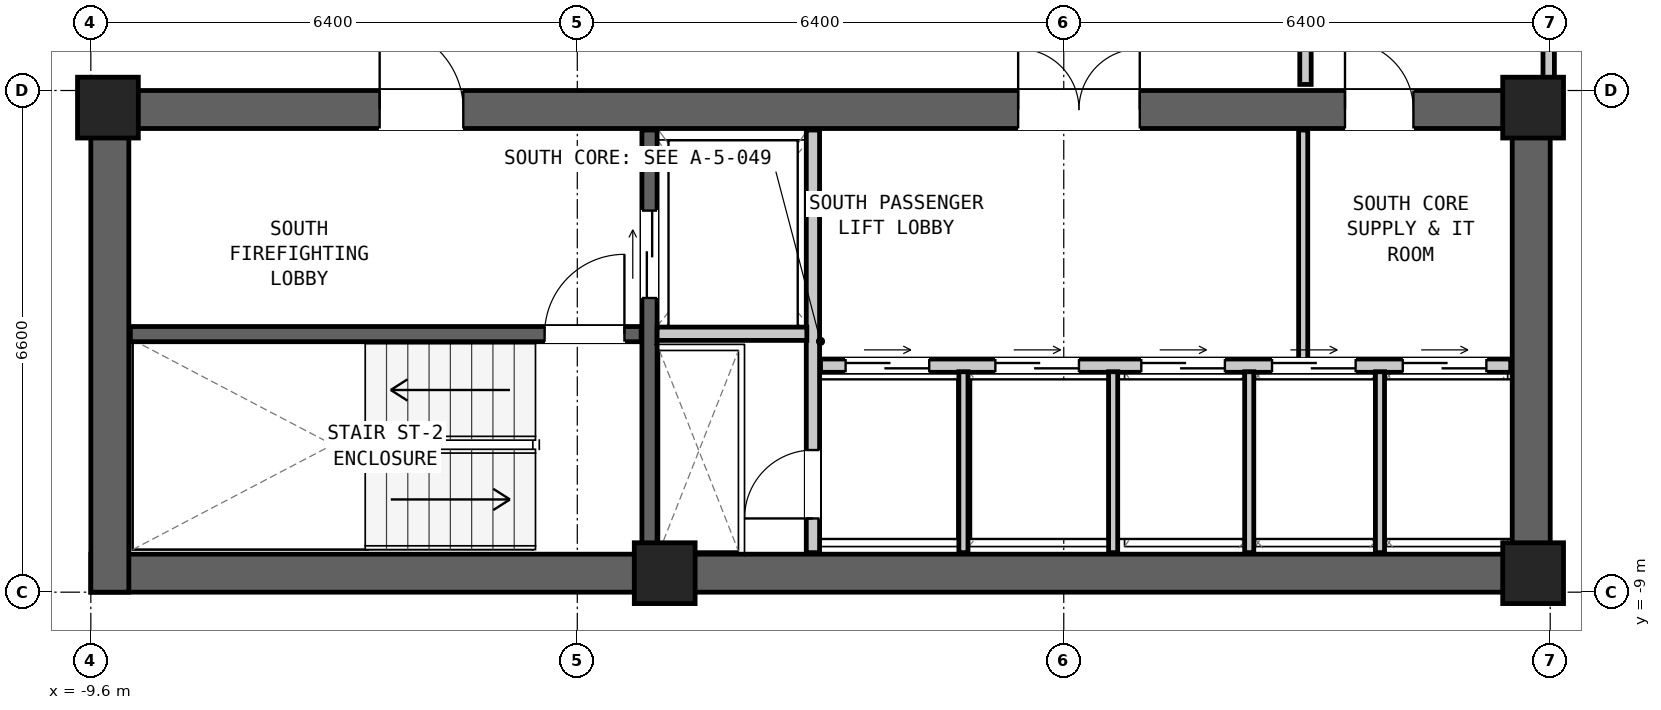
"""IFC4 building model, lengths in metres.
Left out: names, types, materials, properties, quantities, classifications, styles, units other than length and angle.
Written with IfcOpenShell. Run it as: python <this file> out.ifc"""

import sys

from ifc_helpers import new_model, si_unit, direction, frame, frame_2d, origin, origin_2d, place, context, subcontext, project, spatial, rectangle, extrude, element, fill, save


model = new_model("IFC4")
c1 = context("Model", 3, precision=1e-05, world=origin(), true_north=direction((0.0, 1.0)))
c2 = subcontext(c1, "Body", "Model", "MODEL_VIEW")
j1 = project(units=[si_unit("LENGTHUNIT", "METRE"), si_unit("PLANEANGLEUNIT", "RADIAN")], contexts=[c1])
p1 = place(None, origin())
s1 = spatial("IfcSite", under=j1, at=p1, CompositionType="ELEMENT")
p2 = place(p1, origin())
s2 = spatial("IfcBuilding", under=s1, at=p2, CompositionType="ELEMENT")
p3 = place(p2, frame((0.0, 0.0, 159.2)))
s3 = spatial("IfcBuildingStorey", under=s2, at=p3, CompositionType="ELEMENT", Elevation=159.2)
p4 = place(p3, frame((-9.6, -8.75, 0.0), z_axis=(0.0, 0.0, 1.0), x_axis=(1.0, 0.0, 0.0)))
e1 = element("IfcWall", 1, at=p4, inside=s3, PredefinedType="SHEAR", context=c2, shape_type="SweptSolid", body=[
    extrude(rectangle(XDim=19.2, YDim=0.5, at=frame_2d((9.6, 0.0))), origin(), (0.0, 0.0, 1.0), 3.05),
])
p5 = place(p3, frame((-9.6, -2.65, 0.0), z_axis=(0.0, 0.0, 1.0), x_axis=(1.0, 0.0, 0.0)))
e2 = element("IfcWall", 2, at=p5, inside=s3, PredefinedType="SHEAR", context=c2, shape_type="SweptSolid", body=[
    extrude(rectangle(XDim=19.2, YDim=0.5, at=frame_2d((9.6, 0.0))), origin(), (0.0, 0.0, 1.0), 3.05),
])
p6 = place(p5, frame((3.8, 0.0, 0.0)))
e3 = element("IfcOpeningElement", 3, at=p6, cuts=e2, PredefinedType="OPENING", context=c2, shape_type="SweptSolid", body=[
    extrude(rectangle(XDim=1.1, YDim=2.08, at=frame_2d((0.55, 1.04))), frame((0.0, 0.262, 0.0), z_axis=(0.0, -1.0, 0.0), x_axis=(1.0, 0.0, 0.0)), (0.0, 0.0, 1.0), 0.524),
])
p7 = place(p5, frame((12.2, 0.0, 0.0)))
e4 = element("IfcOpeningElement", 4, at=p7, cuts=e2, PredefinedType="OPENING", context=c2, shape_type="SweptSolid", body=[
    extrude(rectangle(XDim=1.6, YDim=2.12, at=frame_2d((0.8, 1.06))), frame((0.0, 0.262, 0.0), z_axis=(0.0, -1.0, 0.0), x_axis=(1.0, 0.0, 0.0)), (0.0, 0.0, 1.0), 0.524),
])
p8 = place(p5, frame((16.5, 0.0, 0.0)))
e5 = element("IfcOpeningElement", 5, at=p8, cuts=e2, PredefinedType="OPENING", context=c2, shape_type="SweptSolid", body=[
    extrude(rectangle(XDim=0.9, YDim=2.05, at=frame_2d((0.45, 1.025))), frame((0.0, 0.262, 0.0), z_axis=(0.0, -1.0, 0.0), x_axis=(1.0, 0.0, 0.0)), (0.0, 0.0, 1.0), 0.524),
])
for number, where, z_axis, x_axis in (
    (6, (-9.35, -9.0, 0.0), (0.0, 0.0, 1.0), (0.0, 1.0, 0.0)),
    (7, (9.35, -9.0, 0.0), (0.0, 0.0, 1.0), (0.0, 1.0, 0.0)),
):
    element("IfcWall", number, at=place(p3, frame(where, z_axis=z_axis, x_axis=x_axis)), inside=s3, PredefinedType="SHEAR", context=c2, shape_type="SweptSolid", body=[
        extrude(rectangle(XDim=6.6, YDim=0.5, at=frame_2d((3.3, 0.0))), origin(), (0.0, 0.0, 1.0), 3.05),
    ])
for number, where, z_axis, x_axis in (
    (8, (-9.375, -2.625, 0.0), (0.0, 0.0, 1.0), (1.0, 0.0, 0.0)),
    (9, (9.375, -2.625, 0.0), (0.0, 0.0, 1.0), (1.0, 0.0, 0.0)),
    (10, (-2.05, -8.75, 0.0), (0.0, 0.0, 1.0), (1.0, 0.0, 0.0)),
    (11, (9.375, -8.75, 0.0), (0.0, 0.0, 1.0), (1.0, 0.0, 0.0)),
):
    element("IfcColumn", number, at=place(p3, frame(where, z_axis=z_axis, x_axis=x_axis)), inside=s3, PredefinedType="COLUMN", context=c2, shape_type="SweptSolid", body=[
        extrude(rectangle(XDim=0.8, YDim=0.8, at=origin_2d()), origin(), (0.0, 0.0, 1.0), 3.05),
    ])
p9 = place(p3, frame((-9.08, -5.605, 0.0), z_axis=(0.0, 0.0, 1.0), x_axis=(1.0, 0.0, 0.0)))
e12 = element("IfcWall", 12, at=p9, inside=s3, PredefinedType="SHEAR", context=c2, shape_type="SweptSolid", body=[
    extrude(rectangle(XDim=6.72, YDim=0.2, at=frame_2d((3.36, 0.0))), origin(), (0.0, 0.0, 1.0), 2.83),
])
p10 = place(p9, frame((5.45, 0.0, 0.0)))
e13 = element("IfcOpeningElement", 13, at=p10, cuts=e12, PredefinedType="OPENING", context=c2, shape_type="SweptSolid", body=[
    extrude(rectangle(XDim=1.05, YDim=2.08, at=frame_2d((0.525, 1.04))), frame((0.0, 0.112, 0.0), z_axis=(0.0, -1.0, 0.0), x_axis=(1.0, 0.0, 0.0)), (0.0, 0.0, 1.0), 0.224),
])
p11 = place(p3, frame((-2.25, -8.48, 0.0), z_axis=(0.0, 0.0, 1.0), x_axis=(0.0, 1.0, 0.0)))
e14 = element("IfcWall", 14, at=p11, inside=s3, PredefinedType="SHEAR", context=c2, shape_type="SweptSolid", body=[
    extrude(rectangle(XDim=5.56, YDim=0.2, at=frame_2d((2.78, 0.0))), origin(), (0.0, 0.0, 1.0), 2.83),
])
p12 = place(p11, frame((3.35, 0.0, 0.0)))
e15 = element("IfcOpeningElement", 15, at=p12, cuts=e14, PredefinedType="OPENING", context=c2, shape_type="SweptSolid", body=[
    extrude(rectangle(XDim=1.15, YDim=2.08, at=frame_2d((0.575, 1.04))), frame((0.0, 0.112, 0.0), z_axis=(0.0, -1.0, 0.0), x_axis=(1.0, 0.0, 0.0)), (0.0, 0.0, 1.0), 0.224),
])
p13 = place(p3, frame((-0.1, -8.48, 0.0), z_axis=(0.0, 0.0, 1.0), x_axis=(0.0, 1.0, 0.0)))
e16 = element("IfcWall", 16, at=p13, inside=s3, PredefinedType="PARTITIONING", context=c2, shape_type="SweptSolid", body=[
    extrude(rectangle(XDim=5.56, YDim=0.175, at=frame_2d((2.78, 0.0))), origin(), (0.0, 0.0, 1.0), 2.83),
])
p14 = place(p13, frame((0.45, 0.0, 0.0)))
e17 = element("IfcOpeningElement", 17, at=p14, cuts=e16, PredefinedType="OPENING", context=c2, shape_type="SweptSolid", body=[
    extrude(rectangle(XDim=0.9, YDim=2.05, at=frame_2d((0.45, 1.025))), frame((0.0, 0.1, 0.0), z_axis=(0.0, -1.0, 0.0), x_axis=(1.0, 0.0, 0.0)), (0.0, 0.0, 1.0), 0.199),
])
p15 = place(p3, frame((-2.15, -5.6, 0.0), z_axis=(0.0, 0.0, 1.0), x_axis=(1.0, 0.0, 0.0)))
e18 = element("IfcWall", 18, at=p15, inside=s3, PredefinedType="PARTITIONING", context=c2, shape_type="SweptSolid", body=[
    extrude(rectangle(XDim=1.97, YDim=0.175, at=frame_2d((0.985, 0.0))), origin(), (0.0, 0.0, 1.0), 2.83),
])
p16 = place(p3, frame((0.0, -6.02, 0.0), z_axis=(0.0, 0.0, 1.0), x_axis=(1.0, 0.0, 0.0)))
e19 = element("IfcWall", 19, at=p16, inside=s3, PredefinedType="PARTITIONING", context=c2, shape_type="SweptSolid", body=[
    extrude(rectangle(XDim=9.08, YDim=0.175, at=frame_2d((4.54, 0.0))), origin(), (0.0, 0.0, 1.0), 2.83),
])
p17 = place(p16, frame((0.33, 0.0, 0.0)))
e20 = element("IfcOpeningElement", 20, at=p17, cuts=e19, PredefinedType="OPENING", context=c2, shape_type="SweptSolid", body=[
    extrude(rectangle(XDim=1.1, YDim=2.06, at=frame_2d((0.55, 1.03))), frame((0.0, 0.1, 0.0), z_axis=(0.0, -1.0, 0.0), x_axis=(1.0, 0.0, 0.0)), (0.0, 0.0, 1.0), 0.199),
])
p18 = place(p16, frame((2.3, 0.0, 0.0)))
e21 = element("IfcOpeningElement", 21, at=p18, cuts=e19, PredefinedType="OPENING", context=c2, shape_type="SweptSolid", body=[
    extrude(rectangle(XDim=1.1, YDim=2.06, at=frame_2d((0.55, 1.03))), frame((0.0, 0.1, 0.0), z_axis=(0.0, -1.0, 0.0), x_axis=(1.0, 0.0, 0.0)), (0.0, 0.0, 1.0), 0.199),
])
p19 = place(p16, frame((4.22, 0.0, 0.0)))
e22 = element("IfcOpeningElement", 22, at=p19, cuts=e19, PredefinedType="OPENING", context=c2, shape_type="SweptSolid", body=[
    extrude(rectangle(XDim=1.1, YDim=2.06, at=frame_2d((0.55, 1.03))), frame((0.0, 0.1, 0.0), z_axis=(0.0, -1.0, 0.0), x_axis=(1.0, 0.0, 0.0)), (0.0, 0.0, 1.0), 0.199),
])
p20 = place(p16, frame((5.94, 0.0, 0.0)))
e23 = element("IfcOpeningElement", 23, at=p20, cuts=e19, PredefinedType="OPENING", context=c2, shape_type="SweptSolid", body=[
    extrude(rectangle(XDim=1.1, YDim=2.06, at=frame_2d((0.55, 1.03))), frame((0.0, 0.1, 0.0), z_axis=(0.0, -1.0, 0.0), x_axis=(1.0, 0.0, 0.0)), (0.0, 0.0, 1.0), 0.199),
])
p21 = place(p16, frame((7.66, 0.0, 0.0)))
e24 = element("IfcOpeningElement", 24, at=p21, cuts=e19, PredefinedType="OPENING", context=c2, shape_type="SweptSolid", body=[
    extrude(rectangle(XDim=1.1, YDim=2.06, at=frame_2d((0.55, 1.03))), frame((0.0, 0.1, 0.0), z_axis=(0.0, -1.0, 0.0), x_axis=(1.0, 0.0, 0.0)), (0.0, 0.0, 1.0), 0.199),
])
for number, where, z_axis, x_axis in (
    (25, (1.88, -8.48, 0.0), (0.0, 0.0, 1.0), (0.0, 1.0, 0.0)),
    (26, (3.85, -8.48, 0.0), (0.0, 0.0, 1.0), (0.0, 1.0, 0.0)),
    (27, (5.64, -8.48, 0.0), (0.0, 0.0, 1.0), (0.0, 1.0, 0.0)),
    (28, (7.36, -8.48, 0.0), (0.0, 0.0, 1.0), (0.0, 1.0, 0.0)),
):
    element("IfcWall", number, at=place(p3, frame(where, z_axis=z_axis, x_axis=x_axis)), inside=s3, PredefinedType="PARTITIONING", context=c2, shape_type="SweptSolid", body=[
        extrude(rectangle(XDim=2.38, YDim=0.12, at=frame_2d((1.19, 0.0))), origin(), (0.0, 0.0, 1.0), 2.83),
    ])
p22 = place(p3, frame((6.35, -5.94, 0.0), z_axis=(0.0, 0.0, 1.0), x_axis=(0.0, 1.0, 0.0)))
e29 = element("IfcWall", 29, at=p22, inside=s3, PredefinedType="PARTITIONING", context=c2, shape_type="SweptSolid", body=[
    extrude(rectangle(XDim=3.02, YDim=0.12, at=frame_2d((1.51, 0.0))), origin(), (0.0, 0.0, 1.0), 2.83),
])
p23 = place(p3, frame((6.38, -2.32, 0.0), z_axis=(0.0, 0.0, 1.0), x_axis=(0.0, 1.0, 0.0)))
e30 = element("IfcWall", 30, at=p23, inside=s3, PredefinedType="PARTITIONING", context=c2, shape_type="SweptSolid", body=[
    extrude(rectangle(XDim=5.84, YDim=0.15, at=frame_2d((2.92, 0.0))), origin(), (0.0, 0.0, 1.0), 2.198),
])
p24 = place(p3, frame((9.58, -2.32, 0.0), z_axis=(0.0, 0.0, 1.0), x_axis=(0.0, 1.0, 0.0)))
e31 = element("IfcWall", 31, at=p24, inside=s3, PredefinedType="PARTITIONING", context=c2, shape_type="SweptSolid", body=[
    extrude(rectangle(XDim=5.84, YDim=0.15, at=frame_2d((2.92, 0.0))), origin(), (0.0, 0.0, 1.0), 2.198),
])
p25 = place(p24, frame((2.445, 0.0, 0.0)))
e32 = element("IfcOpeningElement", 32, at=p25, cuts=e31, PredefinedType="OPENING", context=c2, shape_type="SweptSolid", body=[
    extrude(rectangle(XDim=0.95, YDim=2.1, at=frame_2d((0.475, 1.05))), frame((0.0, 0.087, 0.0), z_axis=(0.0, -1.0, 0.0), x_axis=(1.0, 0.0, 0.0)), (0.0, 0.0, 1.0), 0.174),
])
p26 = place(p10, origin())
e33 = element("IfcDoor", 33, at=p26, inside=s3, OperationType="SINGLE_SWING_RIGHT", PredefinedType="DOOR", context=c2, shape_type="SweptSolid", body=[
    extrude(rectangle(XDim=1.05, YDim=2.08, at=frame_2d((0.525, 1.04))), frame((0.0, 0.025, 0.0), z_axis=(0.0, -1.0, 0.0), x_axis=(1.0, 0.0, 0.0)), (0.0, 0.0, 1.0), 0.05),
])
fill(e13, e33)
p27 = place(p6, origin())
e34 = element("IfcDoor", 34, at=p27, inside=s3, OperationType="SINGLE_SWING_LEFT", PredefinedType="DOOR", context=c2, shape_type="SweptSolid", body=[
    extrude(rectangle(XDim=1.1, YDim=2.08, at=frame_2d((0.55, 1.04))), frame((0.0, 0.025, 0.0), z_axis=(0.0, -1.0, 0.0), x_axis=(1.0, 0.0, 0.0)), (0.0, 0.0, 1.0), 0.05),
])
fill(e3, e34)
p28 = place(p12, origin())
e35 = element("IfcDoor", 35, at=p28, inside=s3, OperationType="DOUBLE_DOOR_SLIDING", PredefinedType="DOOR", context=c2, shape_type="SweptSolid", body=[
    extrude(rectangle(XDim=1.15, YDim=2.08, at=frame_2d((0.575, 1.04))), frame((0.0, 0.025, 0.0), z_axis=(0.0, -1.0, 0.0), x_axis=(1.0, 0.0, 0.0)), (0.0, 0.0, 1.0), 0.05),
])
fill(e15, e35)
p29 = place(p14, origin())
e36 = element("IfcDoor", 36, at=p29, inside=s3, OperationType="SINGLE_SWING_LEFT", PredefinedType="DOOR", context=c2, shape_type="SweptSolid", body=[
    extrude(rectangle(XDim=0.9, YDim=2.05, at=frame_2d((0.45, 1.025))), frame((0.0, 0.025, 0.0), z_axis=(0.0, -1.0, 0.0), x_axis=(1.0, 0.0, 0.0)), (0.0, 0.0, 1.0), 0.05),
])
fill(e17, e36)
p30 = place(p17, origin())
e37 = element("IfcDoor", 37, at=p30, inside=s3, OperationType="DOUBLE_DOOR_SLIDING", PredefinedType="DOOR", context=c2, shape_type="SweptSolid", body=[
    extrude(rectangle(XDim=1.1, YDim=2.06, at=frame_2d((0.55, 1.03))), frame((0.0, 0.025, 0.0), z_axis=(0.0, -1.0, 0.0), x_axis=(1.0, 0.0, 0.0)), (0.0, 0.0, 1.0), 0.05),
])
fill(e20, e37)
p31 = place(p18, origin())
e38 = element("IfcDoor", 38, at=p31, inside=s3, OperationType="DOUBLE_DOOR_SLIDING", PredefinedType="DOOR", context=c2, shape_type="SweptSolid", body=[
    extrude(rectangle(XDim=1.1, YDim=2.06, at=frame_2d((0.55, 1.03))), frame((0.0, 0.025, 0.0), z_axis=(0.0, -1.0, 0.0), x_axis=(1.0, 0.0, 0.0)), (0.0, 0.0, 1.0), 0.05),
])
fill(e21, e38)
p32 = place(p7, origin())
e39 = element("IfcDoor", 39, at=p32, inside=s3, OperationType="DOUBLE_DOOR_SINGLE_SWING", PredefinedType="DOOR", context=c2, shape_type="SweptSolid", body=[
    extrude(rectangle(XDim=1.6, YDim=2.12, at=frame_2d((0.8, 1.06))), frame((0.0, 0.025, 0.0), z_axis=(0.0, -1.0, 0.0), x_axis=(1.0, 0.0, 0.0)), (0.0, 0.0, 1.0), 0.05),
])
fill(e4, e39)
p33 = place(p8, origin())
e40 = element("IfcDoor", 40, at=p33, inside=s3, OperationType="SINGLE_SWING_LEFT", PredefinedType="DOOR", context=c2, shape_type="SweptSolid", body=[
    extrude(rectangle(XDim=0.9, YDim=2.05, at=frame_2d((0.45, 1.025))), frame((0.0, 0.025, 0.0), z_axis=(0.0, -1.0, 0.0), x_axis=(1.0, 0.0, 0.0)), (0.0, 0.0, 1.0), 0.05),
])
fill(e5, e40)
p34 = place(p19, origin())
e41 = element("IfcDoor", 41, at=p34, inside=s3, OperationType="DOUBLE_DOOR_SLIDING", PredefinedType="DOOR", context=c2, shape_type="SweptSolid", body=[
    extrude(rectangle(XDim=1.1, YDim=2.06, at=frame_2d((0.55, 1.03))), frame((0.0, 0.025, 0.0), z_axis=(0.0, -1.0, 0.0), x_axis=(1.0, 0.0, 0.0)), (0.0, 0.0, 1.0), 0.05),
])
fill(e22, e41)
p35 = place(p20, origin())
e42 = element("IfcDoor", 42, at=p35, inside=s3, OperationType="DOUBLE_DOOR_SLIDING", PredefinedType="DOOR", context=c2, shape_type="SweptSolid", body=[
    extrude(rectangle(XDim=1.1, YDim=2.06, at=frame_2d((0.55, 1.03))), frame((0.0, 0.025, 0.0), z_axis=(0.0, -1.0, 0.0), x_axis=(1.0, 0.0, 0.0)), (0.0, 0.0, 1.0), 0.05),
])
fill(e23, e42)
p36 = place(p21, origin())
e43 = element("IfcDoor", 43, at=p36, inside=s3, OperationType="DOUBLE_DOOR_SLIDING", PredefinedType="DOOR", context=c2, shape_type="SweptSolid", body=[
    extrude(rectangle(XDim=1.1, YDim=2.06, at=frame_2d((0.55, 1.03))), frame((0.0, 0.025, 0.0), z_axis=(0.0, -1.0, 0.0), x_axis=(1.0, 0.0, 0.0)), (0.0, 0.0, 1.0), 0.05),
])
fill(e24, e43)
save(model, sys.argv[1])
